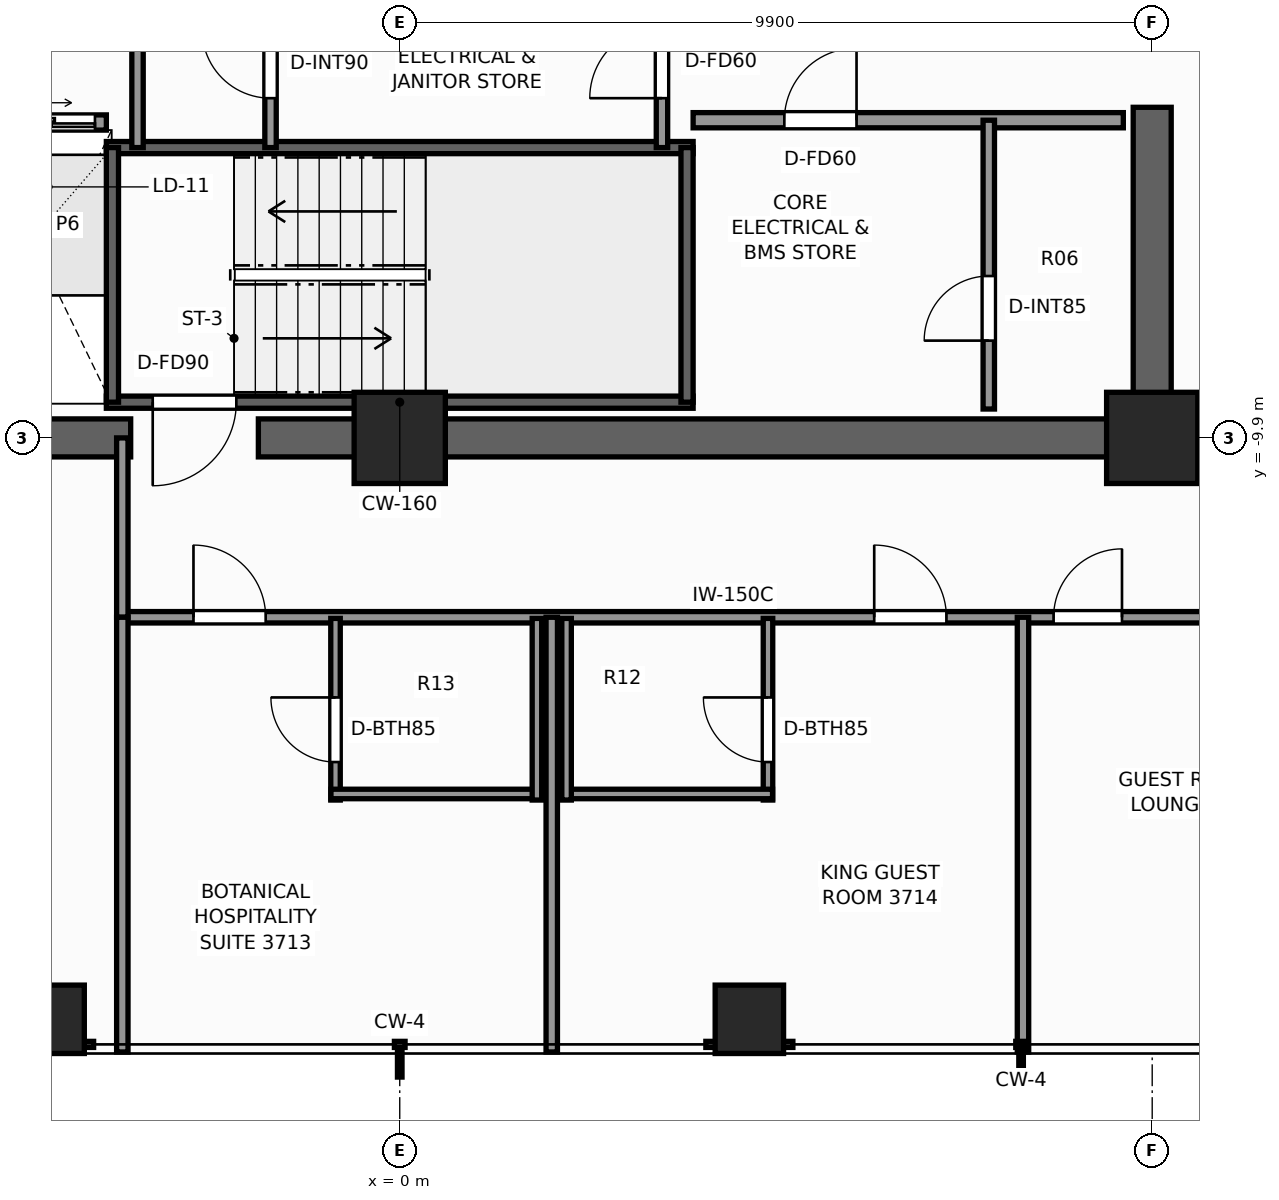
"""IFC4 building model, lengths in metres.
Left out: names, types, materials, properties, quantities, classifications, styles, units other than length and angle.
Written with IfcOpenShell. Run it as: python <this file> out.ifc"""

import sys

from ifc_helpers import new_model, si_unit, direction, frame, frame_2d, origin, origin_2d, place, context, subcontext, project, spatial, rectangle, extrude, element, fill, save


model = new_model("IFC4")
c1 = context("Model", 3, precision=1e-05, world=origin(), true_north=direction((0.0, 1.0)))
c2 = subcontext(c1, "Body", "Model", "MODEL_VIEW")
j1 = project(units=[si_unit("LENGTHUNIT", "METRE"), si_unit("PLANEANGLEUNIT", "RADIAN")], contexts=[c1])
p1 = place(None, origin())
s1 = spatial("IfcSite", under=j1, at=p1, CompositionType="ELEMENT")
p2 = place(p1, origin())
s2 = spatial("IfcBuilding", under=s1, at=p2, CompositionType="ELEMENT")
p3 = place(p2, frame((0.0, 0.0, 128.3)))
s3 = spatial("IfcBuildingStorey", under=s2, at=p3, CompositionType="ELEMENT", Elevation=128.3)
p4 = place(p3, frame((10.15, -9.9, 0.0), z_axis=(0.0, 0.0, 1.0), x_axis=(-1.0, 0.0, 0.0)))
e1 = element("IfcWall", 1, at=p4, inside=s3, PredefinedType="SHEAR", context=c2, shape_type="SweptSolid", body=[
    extrude(rectangle(XDim=12.01, YDim=0.5, at=frame_2d((6.005, 0.0))), origin(), (0.0, 0.0, 1.0), 3.3),
])
p5 = place(p3, frame((-3.54, -9.9, 0.0), z_axis=(0.0, 0.0, 1.0), x_axis=(-1.0, 0.0, 0.0)))
e2 = element("IfcWall", 2, at=p5, inside=s3, PredefinedType="SHEAR", context=c2, shape_type="SweptSolid", body=[
    extrude(rectangle(XDim=6.61, YDim=0.5, at=frame_2d((3.305, 0.0))), origin(), (0.0, 0.0, 1.0), 3.3),
])
p6 = place(p3, frame((9.9, -9.65, 0.0), z_axis=(0.0, 0.0, 1.0), x_axis=(0.0, 1.0, 0.0)))
e3 = element("IfcWall", 3, at=p6, inside=s3, PredefinedType="SHEAR", context=c2, shape_type="SweptSolid", body=[
    extrude(rectangle(XDim=4.1, YDim=0.5, at=frame_2d((2.05, 0.0))), origin(), (0.0, 0.0, 1.0), 3.3),
])
for number, where, z_axis, x_axis in (
    (4, (9.9, -9.9, 0.0), (0.0, 0.0, 1.0), (1.0, 0.0, 0.0)),
    (5, (0.0, -9.9, 0.0), (0.0, 0.0, 1.0), (1.0, 0.0, 0.0)),
):
    element("IfcColumn", number, at=place(p3, frame(where, z_axis=z_axis, x_axis=x_axis)), inside=s3, PredefinedType="COLUMN", context=c2, shape_type="SweptSolid", body=[
        extrude(rectangle(XDim=1.2, YDim=1.2, at=origin_2d()), origin(), (0.0, 0.0, 1.0), 3.3),
    ])
for number, where, z_axis, x_axis in (
    (6, (-4.6, -17.55, 0.0), (0.0, 0.0, 1.0), (1.0, 0.0, 0.0)),
    (7, (4.6, -17.55, 0.0), (0.0, 0.0, 1.0), (1.0, 0.0, 0.0)),
):
    element("IfcColumn", number, at=place(p3, frame(where, z_axis=z_axis, x_axis=x_axis)), inside=s3, PredefinedType="COLUMN", context=c2, shape_type="SweptSolid", body=[
        extrude(rectangle(XDim=0.9, YDim=0.9, at=origin_2d()), origin(), (0.0, 0.0, 1.0), 3.3),
    ])
p7 = place(p3, frame((3.86, -9.43, 0.0), z_axis=(0.0, 0.0, 1.0), x_axis=(-1.0, 0.0, 0.0)))
e8 = element("IfcWall", 8, at=p7, inside=s3, PredefinedType="SHEAR", context=c2, shape_type="SweptSolid", body=[
    extrude(rectangle(XDim=7.72, YDim=0.16, at=frame_2d((3.86, 0.0))), origin(), (0.0, 0.0, 1.0), 3.3),
])
p8 = place(p7, frame((6.01, 0.0, 0.0)))
e9 = element("IfcOpeningElement", 9, at=p8, cuts=e8, PredefinedType="OPENING", context=c2, shape_type="SweptSolid", body=[
    extrude(rectangle(XDim=1.1, YDim=2.2, at=frame_2d((0.55, 1.1))), frame((0.0, 0.09, 0.0), z_axis=(0.0, -1.0, 0.0), x_axis=(1.0, 0.0, 0.0)), (0.0, 0.0, 1.0), 0.18),
])
p9 = place(p3, frame((-3.86, -6.08, 0.0), z_axis=(0.0, 0.0, 1.0), x_axis=(1.0, 0.0, 0.0)))
e10 = element("IfcWall", 10, at=p9, inside=s3, PredefinedType="SHEAR", context=c2, shape_type="SweptSolid", body=[
    extrude(rectangle(XDim=7.72, YDim=0.16, at=frame_2d((3.86, 0.0))), origin(), (0.0, 0.0, 1.0), 3.3),
])
for number, where, z_axis, x_axis in (
    (11, (-3.78, -9.43, 0.0), (0.0, 0.0, 1.0), (0.0, 1.0, 0.0)),
    (12, (3.78, -9.43, 0.0), (0.0, 0.0, 1.0), (0.0, 1.0, 0.0)),
):
    element("IfcWall", number, at=place(p3, frame(where, z_axis=z_axis, x_axis=x_axis)), inside=s3, PredefinedType="SHEAR", context=c2, shape_type="SweptSolid", body=[
        extrude(rectangle(XDim=3.35, YDim=0.16, at=frame_2d((1.675, 0.0))), origin(), (0.0, 0.0, 1.0), 3.3),
    ])
p10 = place(p3, frame((-9.52, -5.75, 0.0), z_axis=(0.0, 0.0, 1.0), x_axis=(1.0, 0.0, 0.0)))
e13 = element("IfcWall", 13, at=p10, inside=s3, PredefinedType="SOLIDWALL", context=c2, shape_type="SweptSolid", body=[
    extrude(rectangle(XDim=5.66, YDim=0.2, at=frame_2d((2.83, 0.0))), origin(), (0.0, 0.0, 1.0), 3.1),
])
p11 = place(p10, frame((0.55, 0.0, 0.0)))
e14 = element("IfcOpeningElement", 14, at=p11, cuts=e13, PredefinedType="OPENING", context=c2, shape_type="SweptSolid", body=[
    extrude(rectangle(XDim=1.1, YDim=2.2, at=frame_2d((0.55, 1.1))), frame((0.0, 0.11, 0.0), z_axis=(0.0, -1.0, 0.0), x_axis=(1.0, 0.0, 0.0)), (0.0, 0.0, 1.0), 0.22),
])
p12 = place(p10, frame((2.48, 0.0, 0.0)))
e15 = element("IfcOpeningElement", 15, at=p12, cuts=e13, PredefinedType="OPENING", context=c2, shape_type="SweptSolid", body=[
    extrude(rectangle(XDim=1.1, YDim=2.2, at=frame_2d((0.55, 1.1))), frame((0.0, 0.11, 0.0), z_axis=(0.0, -1.0, 0.0), x_axis=(1.0, 0.0, 0.0)), (0.0, 0.0, 1.0), 0.22),
])
p13 = place(p10, frame((4.41, 0.0, 0.0)))
e16 = element("IfcOpeningElement", 16, at=p13, cuts=e13, PredefinedType="OPENING", context=c2, shape_type="SweptSolid", body=[
    extrude(rectangle(XDim=1.1, YDim=2.2, at=frame_2d((0.55, 1.1))), frame((0.0, 0.11, 0.0), z_axis=(0.0, -1.0, 0.0), x_axis=(1.0, 0.0, 0.0)), (0.0, 0.0, 1.0), 0.22),
])
p14 = place(p3, frame((3.86, -5.72, 0.0), z_axis=(0.0, 0.0, 1.0), x_axis=(1.0, 0.0, 0.0)))
e17 = element("IfcWall", 17, at=p14, inside=s3, PredefinedType="SOLIDWALL", context=c2, shape_type="SweptSolid", body=[
    extrude(rectangle(XDim=5.66, YDim=0.2, at=frame_2d((2.83, 0.0))), origin(), (0.0, 0.0, 1.0), 3.1),
])
p15 = place(p14, frame((1.2, 0.0, 0.0)))
e18 = element("IfcOpeningElement", 18, at=p15, cuts=e17, PredefinedType="OPENING", context=c2, shape_type="SweptSolid", body=[
    extrude(rectangle(XDim=0.95, YDim=2.06, at=frame_2d((0.475, 1.03))), frame((0.0, 0.11, 0.0), z_axis=(0.0, -1.0, 0.0), x_axis=(1.0, 0.0, 0.0)), (0.0, 0.0, 1.0), 0.22),
])
p16 = place(p3, frame((7.75, -9.52, 0.0), z_axis=(0.0, 0.0, 1.0), x_axis=(0.0, 1.0, 0.0)))
e19 = element("IfcWall", 19, at=p16, inside=s3, PredefinedType="PARTITIONING", context=c2, shape_type="SweptSolid", body=[
    extrude(rectangle(XDim=3.8, YDim=0.15, at=frame_2d((1.9, 0.0))), origin(), (0.0, 0.0, 1.0), 3.1),
])
p17 = place(p16, frame((0.9, 0.0, 0.0)))
e20 = element("IfcOpeningElement", 20, at=p17, cuts=e19, PredefinedType="OPENING", context=c2, shape_type="SweptSolid", body=[
    extrude(rectangle(XDim=0.85, YDim=2.03, at=frame_2d((0.425, 1.015))), frame((0.0, 0.085, 0.0), z_axis=(0.0, -1.0, 0.0), x_axis=(1.0, 0.0, 0.0)), (0.0, 0.0, 1.0), 0.17),
])
p18 = place(p3, frame((3.45, -6.08, 0.0), z_axis=(0.0, 0.0, 1.0), x_axis=(0.0, 1.0, 0.0)))
e21 = element("IfcWall", 21, at=p18, inside=s3, PredefinedType="PARTITIONING", context=c2, shape_type="SweptSolid", body=[
    extrude(rectangle(XDim=2.36, YDim=0.15, at=frame_2d((1.18, 0.0))), origin(), (0.0, 0.0, 1.0), 3.1),
])
p19 = place(p18, frame((0.65, 0.0, 0.0)))
e22 = element("IfcOpeningElement", 22, at=p19, cuts=e21, PredefinedType="OPENING", context=c2, shape_type="SweptSolid", body=[
    extrude(rectangle(XDim=0.95, YDim=2.06, at=frame_2d((0.475, 1.03))), frame((0.0, 0.085, 0.0), z_axis=(0.0, -1.0, 0.0), x_axis=(1.0, 0.0, 0.0)), (0.0, 0.0, 1.0), 0.17),
])
p20 = place(p3, frame((-3.45, -6.08, 0.0), z_axis=(0.0, 0.0, 1.0), x_axis=(0.0, 1.0, 0.0)))
e23 = element("IfcWall", 23, at=p20, inside=s3, PredefinedType="PARTITIONING", context=c2, shape_type="SweptSolid", body=[
    extrude(rectangle(XDim=2.36, YDim=0.15, at=frame_2d((1.18, 0.0))), origin(), (0.0, 0.0, 1.0), 3.1),
])
p21 = place(p3, frame((-1.7, -6.08, 0.0), z_axis=(0.0, 0.0, 1.0), x_axis=(0.0, 1.0, 0.0)))
e24 = element("IfcWall", 24, at=p21, inside=s3, PredefinedType="PARTITIONING", context=c2, shape_type="SweptSolid", body=[
    extrude(rectangle(XDim=2.36, YDim=0.15, at=frame_2d((1.18, 0.0))), origin(), (0.0, 0.0, 1.0), 3.1),
])
p22 = place(p21, frame((0.65, 0.0, 0.0)))
e25 = element("IfcOpeningElement", 25, at=p22, cuts=e24, PredefinedType="OPENING", context=c2, shape_type="SweptSolid", body=[
    extrude(rectangle(XDim=0.9, YDim=2.06, at=frame_2d((0.45, 1.03))), frame((0.0, 0.085, 0.0), z_axis=(0.0, -1.0, 0.0), x_axis=(1.0, 0.0, 0.0)), (0.0, 0.0, 1.0), 0.17),
])
p23 = place(p3, frame((-3.65, -12.26, 0.0), z_axis=(0.0, 0.0, 1.0), x_axis=(1.0, 0.0, 0.0)))
e26 = element("IfcWall", 26, at=p23, inside=s3, PredefinedType="PARTITIONING", context=c2, shape_type="SweptSolid", body=[
    extrude(rectangle(XDim=16.07, YDim=0.15, at=frame_2d((8.035, 0.0))), origin(), (0.0, 0.0, 1.0), 2.312),
])
p24 = place(p23, frame((0.936, 0.0, 0.0)))
e27 = element("IfcOpeningElement", 27, at=p24, cuts=e26, PredefinedType="OPENING", context=c2, shape_type="SweptSolid", body=[
    extrude(rectangle(XDim=0.95, YDim=2.06, at=frame_2d((0.475, 1.03))), frame((0.0, 0.085, 0.0), z_axis=(0.0, -1.0, 0.0), x_axis=(1.0, 0.0, 0.0)), (0.0, 0.0, 1.0), 0.17),
])
p25 = place(p23, frame((9.893, 0.0, 0.0)))
e28 = element("IfcOpeningElement", 28, at=p25, cuts=e26, PredefinedType="OPENING", context=c2, shape_type="SweptSolid", body=[
    extrude(rectangle(XDim=0.95, YDim=2.06, at=frame_2d((0.475, 1.03))), frame((0.0, 0.085, 0.0), z_axis=(0.0, -1.0, 0.0), x_axis=(1.0, 0.0, 0.0)), (0.0, 0.0, 1.0), 0.17),
])
p26 = place(p23, frame((12.253, 0.0, 0.0)))
e29 = element("IfcOpeningElement", 29, at=p26, cuts=e26, PredefinedType="OPENING", context=c2, shape_type="SweptSolid", body=[
    extrude(rectangle(XDim=0.9, YDim=2.06, at=frame_2d((0.45, 1.03))), frame((0.0, 0.085, 0.0), z_axis=(0.0, -1.0, 0.0), x_axis=(1.0, 0.0, 0.0)), (0.0, 0.0, 1.0), 0.17),
])
p27 = place(p3, frame((-3.65, -12.26, 0.0), z_axis=(0.0, 0.0, 1.0), x_axis=(0.0, 1.0, 0.0)))
e30 = element("IfcWall", 30, at=p27, inside=s3, PredefinedType="PARTITIONING", context=c2, shape_type="SweptSolid", body=[
    extrude(rectangle(XDim=2.36, YDim=0.15, at=frame_2d((1.18, 0.0))), origin(), (0.0, 0.0, 1.0), 3.1),
])
for number, where, z_axis, x_axis in (
    (31, (-3.65, -17.98, 0.0), (0.0, 0.0, 1.0), (0.0, 1.0, 0.0)),
    (32, (2.0, -17.98, 0.0), (0.0, 0.0, 1.0), (0.0, 1.0, 0.0)),
):
    element("IfcWall", number, at=place(p3, frame(where, z_axis=z_axis, x_axis=x_axis)), inside=s3, PredefinedType="PARTITIONING", context=c2, shape_type="SweptSolid", body=[
        extrude(rectangle(XDim=5.72, YDim=0.15, at=frame_2d((2.86, 0.0))), origin(), (0.0, 0.0, 1.0), 2.469),
    ])
p28 = place(p3, frame((-0.845, -14.665, 0.0), z_axis=(0.0, 0.0, 1.0), x_axis=(0.0, 1.0, 0.0)))
e33 = element("IfcWall", 33, at=p28, inside=s3, PredefinedType="PARTITIONING", context=c2, shape_type="SweptSolid", body=[
    extrude(rectangle(XDim=2.39, YDim=0.125, at=frame_2d((1.195, 0.0))), origin(), (0.0, 0.0, 1.0), 3.1),
])
p29 = place(p28, frame((0.5, 0.0, 0.0)))
e34 = element("IfcOpeningElement", 34, at=p29, cuts=e33, PredefinedType="OPENING", context=c2, shape_type="SweptSolid", body=[
    extrude(rectangle(XDim=0.85, YDim=2.03, at=frame_2d((0.425, 1.015))), frame((0.0, 0.073, 0.0), z_axis=(0.0, -1.0, 0.0), x_axis=(1.0, 0.0, 0.0)), (0.0, 0.0, 1.0), 0.145),
])
p30 = place(p3, frame((-0.905, -14.585, 0.0), z_axis=(0.0, 0.0, 1.0), x_axis=(1.0, 0.0, 0.0)))
e35 = element("IfcWall", 35, at=p30, inside=s3, PredefinedType="PARTITIONING", context=c2, shape_type="SweptSolid", body=[
    extrude(rectangle(XDim=2.77, YDim=0.125, at=frame_2d((1.385, 0.0))), origin(), (0.0, 0.0, 1.0), 2.625),
])
p31 = place(p3, frame((1.805, -14.665, 0.0), z_axis=(0.0, 0.0, 1.0), x_axis=(0.0, 1.0, 0.0)))
e36 = element("IfcWall", 36, at=p31, inside=s3, PredefinedType="PARTITIONING", context=c2, shape_type="SweptSolid", body=[
    extrude(rectangle(XDim=2.39, YDim=0.125, at=frame_2d((1.195, 0.0))), origin(), (0.0, 0.0, 1.0), 3.1),
])
p32 = place(p3, frame((8.2, -17.98, 0.0), z_axis=(0.0, 0.0, 1.0), x_axis=(0.0, 1.0, 0.0)))
e37 = element("IfcWall", 37, at=p32, inside=s3, PredefinedType="PARTITIONING", context=c2, shape_type="SweptSolid", body=[
    extrude(rectangle(XDim=5.72, YDim=0.15, at=frame_2d((2.86, 0.0))), origin(), (0.0, 0.0, 1.0), 2.469),
])
p33 = place(p3, frame((4.845, -14.665, 0.0), z_axis=(0.0, 0.0, 1.0), x_axis=(0.0, 1.0, 0.0)))
e38 = element("IfcWall", 38, at=p33, inside=s3, PredefinedType="PARTITIONING", context=c2, shape_type="SweptSolid", body=[
    extrude(rectangle(XDim=2.39, YDim=0.125, at=frame_2d((1.195, 0.0))), origin(), (0.0, 0.0, 1.0), 2.312),
])
p34 = place(p33, frame((0.5, 0.0, 0.0)))
e39 = element("IfcOpeningElement", 39, at=p34, cuts=e38, PredefinedType="OPENING", context=c2, shape_type="SweptSolid", body=[
    extrude(rectangle(XDim=0.85, YDim=2.03, at=frame_2d((0.425, 1.015))), frame((0.0, 0.073, 0.0), z_axis=(0.0, -1.0, 0.0), x_axis=(1.0, 0.0, 0.0)), (0.0, 0.0, 1.0), 0.145),
])
p35 = place(p3, frame((2.135, -14.585, 0.0), z_axis=(0.0, 0.0, 1.0), x_axis=(1.0, 0.0, 0.0)))
e40 = element("IfcWall", 40, at=p35, inside=s3, PredefinedType="PARTITIONING", context=c2, shape_type="SweptSolid", body=[
    extrude(rectangle(XDim=2.77, YDim=0.125, at=frame_2d((1.385, 0.0))), origin(), (0.0, 0.0, 1.0), 2.312),
])
p36 = place(p3, frame((2.195, -14.665, 0.0), z_axis=(0.0, 0.0, 1.0), x_axis=(0.0, 1.0, 0.0)))
e41 = element("IfcWall", 41, at=p36, inside=s3, PredefinedType="PARTITIONING", context=c2, shape_type="SweptSolid", body=[
    extrude(rectangle(XDim=2.39, YDim=0.125, at=frame_2d((1.195, 0.0))), origin(), (0.0, 0.0, 1.0), 3.1),
])
p37 = place(p8, origin())
e42 = element("IfcDoor", 42, at=p37, inside=s3, OperationType="SINGLE_SWING_RIGHT", PredefinedType="DOOR", context=c2, shape_type="SweptSolid", body=[
    extrude(rectangle(XDim=1.1, YDim=2.2, at=frame_2d((0.55, 1.1))), frame((0.0, 0.025, 0.0), z_axis=(0.0, -1.0, 0.0), x_axis=(1.0, 0.0, 0.0)), (0.0, 0.0, 1.0), 0.05),
])
fill(e9, e42)
p38 = place(p13, origin())
e43 = element("IfcDoor", 43, at=p38, inside=s3, OperationType="DOUBLE_DOOR_SLIDING", PredefinedType="DOOR", context=c2, shape_type="SweptSolid", body=[
    extrude(rectangle(XDim=1.1, YDim=2.2, at=frame_2d((0.55, 1.1))), frame((0.0, 0.025, 0.0), z_axis=(0.0, -1.0, 0.0), x_axis=(1.0, 0.0, 0.0)), (0.0, 0.0, 1.0), 0.05),
])
fill(e16, e43)
p39 = place(p15, origin())
e44 = element("IfcDoor", 44, at=p39, inside=s3, OperationType="SINGLE_SWING_RIGHT", PredefinedType="DOOR", context=c2, shape_type="SweptSolid", body=[
    extrude(rectangle(XDim=0.95, YDim=2.06, at=frame_2d((0.475, 1.03))), frame((0.0, 0.025, 0.0), z_axis=(0.0, -1.0, 0.0), x_axis=(1.0, 0.0, 0.0)), (0.0, 0.0, 1.0), 0.05),
])
fill(e18, e44)
p40 = place(p17, origin())
e45 = element("IfcDoor", 45, at=p40, inside=s3, OperationType="SINGLE_SWING_LEFT", PredefinedType="DOOR", context=c2, shape_type="SweptSolid", body=[
    extrude(rectangle(XDim=0.85, YDim=2.03, at=frame_2d((0.425, 1.015))), frame((0.0, 0.025, 0.0), z_axis=(0.0, -1.0, 0.0), x_axis=(1.0, 0.0, 0.0)), (0.0, 0.0, 1.0), 0.05),
])
fill(e20, e45)
p41 = place(p19, origin())
e46 = element("IfcDoor", 46, at=p41, inside=s3, OperationType="SINGLE_SWING_LEFT", PredefinedType="DOOR", context=c2, shape_type="SweptSolid", body=[
    extrude(rectangle(XDim=0.95, YDim=2.06, at=frame_2d((0.475, 1.03))), frame((0.0, 0.025, 0.0), z_axis=(0.0, -1.0, 0.0), x_axis=(1.0, 0.0, 0.0)), (0.0, 0.0, 1.0), 0.05),
])
fill(e22, e46)
p42 = place(p22, origin())
e47 = element("IfcDoor", 47, at=p42, inside=s3, OperationType="SINGLE_SWING_RIGHT", PredefinedType="DOOR", context=c2, shape_type="SweptSolid", body=[
    extrude(rectangle(XDim=0.9, YDim=2.06, at=frame_2d((0.45, 1.03))), frame((0.0, 0.025, 0.0), z_axis=(0.0, -1.0, 0.0), x_axis=(1.0, 0.0, 0.0)), (0.0, 0.0, 1.0), 0.05),
])
fill(e25, e47)
p43 = place(p29, origin())
e48 = element("IfcDoor", 48, at=p43, inside=s3, OperationType="SINGLE_SWING_RIGHT", PredefinedType="DOOR", context=c2, shape_type="SweptSolid", body=[
    extrude(rectangle(XDim=0.85, YDim=2.03, at=frame_2d((0.425, 1.015))), frame((0.0, 0.025, 0.0), z_axis=(0.0, -1.0, 0.0), x_axis=(1.0, 0.0, 0.0)), (0.0, 0.0, 1.0), 0.05),
])
fill(e34, e48)
p44 = place(p24, origin())
e49 = element("IfcDoor", 49, at=p44, inside=s3, OperationType="SINGLE_SWING_LEFT", PredefinedType="DOOR", context=c2, shape_type="SweptSolid", body=[
    extrude(rectangle(XDim=0.95, YDim=2.06, at=frame_2d((0.475, 1.03))), frame((0.0, 0.025, 0.0), z_axis=(0.0, -1.0, 0.0), x_axis=(1.0, 0.0, 0.0)), (0.0, 0.0, 1.0), 0.05),
])
fill(e27, e49)
p45 = place(p34, origin())
e50 = element("IfcDoor", 50, at=p45, inside=s3, OperationType="SINGLE_SWING_RIGHT", PredefinedType="DOOR", context=c2, shape_type="SweptSolid", body=[
    extrude(rectangle(XDim=0.85, YDim=2.03, at=frame_2d((0.425, 1.015))), frame((0.0, 0.025, 0.0), z_axis=(0.0, -1.0, 0.0), x_axis=(1.0, 0.0, 0.0)), (0.0, 0.0, 1.0), 0.05),
])
fill(e39, e50)
p46 = place(p25, origin())
e51 = element("IfcDoor", 51, at=p46, inside=s3, OperationType="SINGLE_SWING_LEFT", PredefinedType="DOOR", context=c2, shape_type="SweptSolid", body=[
    extrude(rectangle(XDim=0.95, YDim=2.06, at=frame_2d((0.475, 1.03))), frame((0.0, 0.025, 0.0), z_axis=(0.0, -1.0, 0.0), x_axis=(1.0, 0.0, 0.0)), (0.0, 0.0, 1.0), 0.05),
])
fill(e28, e51)
p47 = place(p26, origin())
e52 = element("IfcDoor", 52, at=p47, inside=s3, OperationType="SINGLE_SWING_RIGHT", PredefinedType="DOOR", context=c2, shape_type="SweptSolid", body=[
    extrude(rectangle(XDim=0.9, YDim=2.06, at=frame_2d((0.45, 1.03))), frame((0.0, 0.025, 0.0), z_axis=(0.0, -1.0, 0.0), x_axis=(1.0, 0.0, 0.0)), (0.0, 0.0, 1.0), 0.05),
])
fill(e29, e52)
save(model, sys.argv[1])
